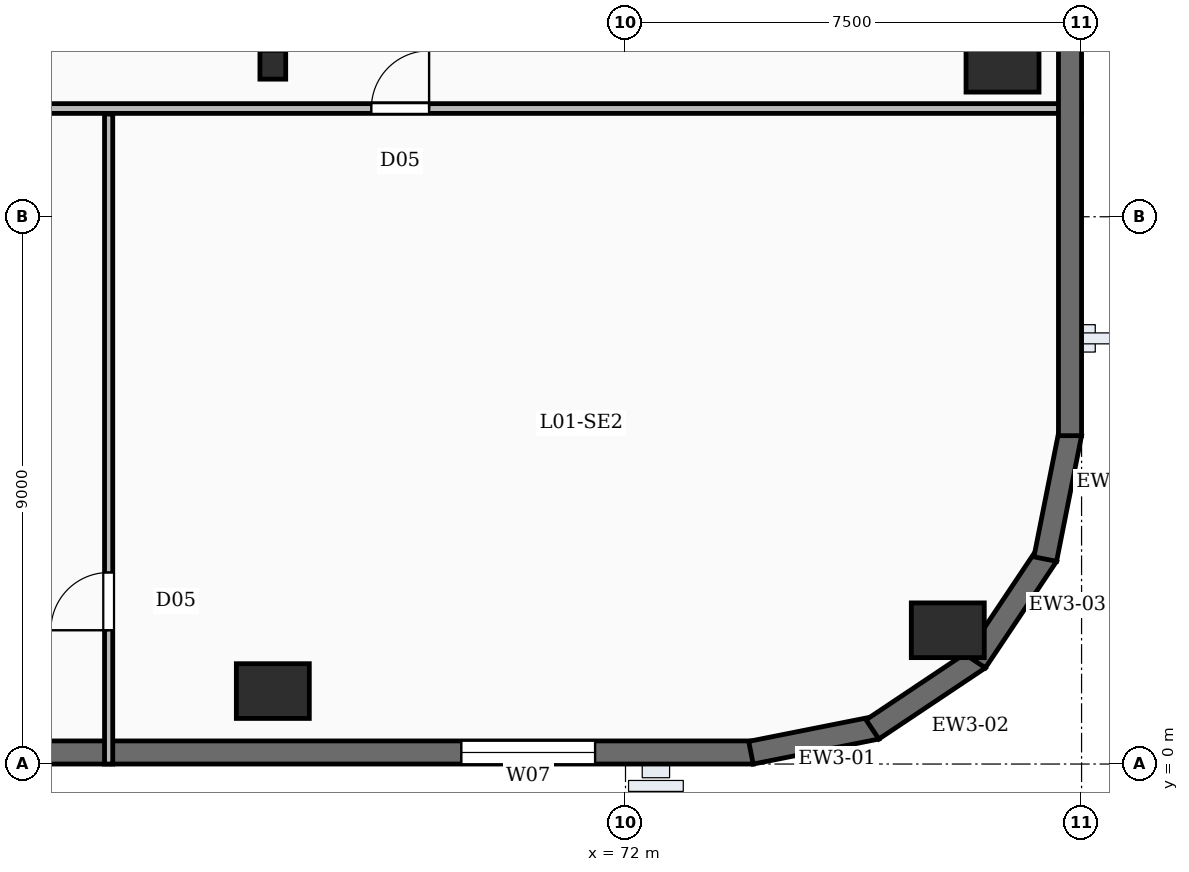
"""IFC4 building model, lengths in metres.
Left out: names, types, materials, properties, quantities, classifications, styles, units other than length and angle.
Written with IfcOpenShell. Run it as: python <this file> out.ifc"""

import sys

from ifc_helpers import new_model, si_unit, direction, frame, frame_2d, origin, origin_2d, place, context, subcontext, project, spatial, rectangle, i_section, extrude, element, fill, save


model = new_model("IFC4")
c1 = context("Model", 3, precision=1e-05, world=origin(), true_north=direction((0.0, 1.0)))
c2 = subcontext(c1, "Body", "Model", "MODEL_VIEW")
j1 = project(units=[si_unit("LENGTHUNIT", "METRE"), si_unit("PLANEANGLEUNIT", "RADIAN")], contexts=[c1])
p1 = place(None, origin())
s1 = spatial("IfcSite", under=j1, at=p1, CompositionType="ELEMENT")
p2 = place(p1, origin())
s2 = spatial("IfcBuilding", under=s1, at=p2, CompositionType="ELEMENT")
p3 = place(p2, frame((0.0, 0.0, 8.0)))
s3 = spatial("IfcBuildingStorey", under=s2, at=p3, CompositionType="ELEMENT", Elevation=8.0)
for number, where, z_axis, x_axis in (
    (1, (66.2, 1.2, -0.35), (0.0, 0.0, 1.0), (1.0, 0.0, 0.0)),
    (2, (77.3, 2.2, -0.35), (0.0, 0.0, 1.0), (1.0, 0.0, 0.0)),
    (3, (78.2, 11.5, -0.35), (0.0, 0.0, 1.0), (1.0, 0.0, 0.0)),
):
    element("IfcColumn", number, at=place(p3, frame(where, z_axis=z_axis, x_axis=x_axis)), inside=s3, PredefinedType="COLUMN", context=c2, shape_type="SweptSolid", body=[
        extrude(rectangle(XDim=1.2, YDim=0.9, at=origin_2d()), origin(), (0.0, 0.0, 1.0), 5.0),
    ])
p4 = place(p3, frame((66.2, 11.5, -0.35), z_axis=(0.0, 0.0, 1.0), x_axis=(1.0, 0.0, 0.0)))
e4 = element("IfcColumn", 4, at=p4, inside=s3, PredefinedType="COLUMN", context=c2, shape_type="SweptSolid", body=[
    extrude(i_section(OverallWidth=0.424, OverallDepth=0.474, WebThickness=0.048, FlangeThickness=0.077, FilletRadius=0.02, at=origin_2d()), origin(), (0.0, 0.0, 1.0), 5.0),
])
for number, where, z_axis, x_axis in (
    (5, (76.129, 0.597, 0.0), (0.0, 0.0, 1.0), (-0.981, -0.195, 0.0)),
    (6, (77.813, 1.74, 0.0), (0.0, 0.0, 1.0), (-0.832, -0.556, 0.0)),
    (7, (78.931, 3.439, 0.0), (0.0, 0.0, 1.0), (-0.556, -0.832, 0.0)),
    (8, (79.314, 5.437, 0.0), (0.0, 0.0, 1.0), (-0.195, -0.981, 0.0)),
):
    element("IfcWall", number, at=place(p3, frame(where, z_axis=z_axis, x_axis=x_axis)), inside=s3, PredefinedType="SOLIDWALL", context=c2, shape_type="SweptSolid", body=[
        extrude(rectangle(XDim=2.107, YDim=0.38, at=frame_2d((1.053, 0.0))), origin(), (0.0, 0.0, 1.0), 4.65),
    ])
p5 = place(p3, frame((79.31, 49.1, 0.0), z_axis=(0.0, 0.0, 1.0), x_axis=(0.0, -1.0, 0.0)))
e9 = element("IfcWall", 9, at=p5, inside=s3, PredefinedType="SOLIDWALL", context=c2, shape_type="SweptSolid", body=[
    extrude(rectangle(XDim=43.7, YDim=0.38, at=frame_2d((21.85, 0.0))), origin(), (0.0, 0.0, 1.0), 4.65),
])
p6 = place(p5, frame((2.6, 0.0, 0.95)))
e10 = element("IfcOpeningElement", 10, at=p6, cuts=e9, PredefinedType="OPENING", context=c2, shape_type="SweptSolid", body=[
    extrude(rectangle(XDim=2.2, YDim=2.5, at=frame_2d((1.1, 1.25))), frame((0.0, 0.2, 0.0), z_axis=(0.0, -1.0, 0.0), x_axis=(1.0, 0.0, 0.0)), (0.0, 0.0, 1.0), 0.4),
])
p7 = place(p5, frame((8.0, 0.0, 0.95)))
e11 = element("IfcOpeningElement", 11, at=p7, cuts=e9, PredefinedType="OPENING", context=c2, shape_type="SweptSolid", body=[
    extrude(rectangle(XDim=2.2, YDim=2.5, at=frame_2d((1.1, 1.25))), frame((0.0, 0.2, 0.0), z_axis=(0.0, -1.0, 0.0), x_axis=(1.0, 0.0, 0.0)), (0.0, 0.0, 1.0), 0.4),
])
p8 = place(p5, frame((29.6, 0.0, 0.95)))
e12 = element("IfcOpeningElement", 12, at=p8, cuts=e9, PredefinedType="OPENING", context=c2, shape_type="SweptSolid", body=[
    extrude(rectangle(XDim=2.2, YDim=2.5, at=frame_2d((1.1, 1.25))), frame((0.0, 0.2, 0.0), z_axis=(0.0, -1.0, 0.0), x_axis=(1.0, 0.0, 0.0)), (0.0, 0.0, 1.0), 0.4),
])
p9 = place(p3, frame((74.1, 0.19, 0.0), z_axis=(0.0, 0.0, 1.0), x_axis=(-1.0, 0.0, 0.0)))
e13 = element("IfcWall", 13, at=p9, inside=s3, PredefinedType="SOLIDWALL", context=c2, shape_type="SweptSolid", body=[
    extrude(rectangle(XDim=68.7, YDim=0.38, at=frame_2d((34.35, 0.0))), origin(), (0.0, 0.0, 1.0), 4.65),
])
p10 = place(p9, frame((2.6, 0.0, 0.95)))
e14 = element("IfcOpeningElement", 14, at=p10, cuts=e13, PredefinedType="OPENING", context=c2, shape_type="SweptSolid", body=[
    extrude(rectangle(XDim=2.2, YDim=2.5, at=frame_2d((1.1, 1.25))), frame((0.0, 0.2, 0.0), z_axis=(0.0, -1.0, 0.0), x_axis=(1.0, 0.0, 0.0)), (0.0, 0.0, 1.0), 0.4),
])
p11 = place(p9, frame((18.8, 0.0, 0.95)))
e15 = element("IfcOpeningElement", 15, at=p11, cuts=e13, PredefinedType="OPENING", context=c2, shape_type="SweptSolid", body=[
    extrude(rectangle(XDim=2.2, YDim=2.5, at=frame_2d((1.1, 1.25))), frame((0.0, 0.2, 0.0), z_axis=(0.0, -1.0, 0.0), x_axis=(1.0, 0.0, 0.0)), (0.0, 0.0, 1.0), 0.4),
])
p12 = place(p9, frame((29.6, 0.0, 0.95)))
e16 = element("IfcOpeningElement", 16, at=p12, cuts=e13, PredefinedType="OPENING", context=c2, shape_type="SweptSolid", body=[
    extrude(rectangle(XDim=2.2, YDim=2.5, at=frame_2d((1.1, 1.25))), frame((0.0, 0.2, 0.0), z_axis=(0.0, -1.0, 0.0), x_axis=(1.0, 0.0, 0.0)), (0.0, 0.0, 1.0), 0.4),
])
p13 = place(p9, frame((40.4, 0.0, 0.95)))
e17 = element("IfcOpeningElement", 17, at=p13, cuts=e13, PredefinedType="OPENING", context=c2, shape_type="SweptSolid", body=[
    extrude(rectangle(XDim=2.2, YDim=2.5, at=frame_2d((1.1, 1.25))), frame((0.0, 0.2, 0.0), z_axis=(0.0, -1.0, 0.0), x_axis=(1.0, 0.0, 0.0)), (0.0, 0.0, 1.0), 0.4),
])
p14 = place(p9, frame((45.8, 0.0, 0.95)))
e18 = element("IfcOpeningElement", 18, at=p14, cuts=e13, PredefinedType="OPENING", context=c2, shape_type="SweptSolid", body=[
    extrude(rectangle(XDim=2.2, YDim=2.5, at=frame_2d((1.1, 1.25))), frame((0.0, 0.2, 0.0), z_axis=(0.0, -1.0, 0.0), x_axis=(1.0, 0.0, 0.0)), (0.0, 0.0, 1.0), 0.4),
])
p15 = place(p9, frame((51.2, 0.0, 0.95)))
e19 = element("IfcOpeningElement", 19, at=p15, cuts=e13, PredefinedType="OPENING", context=c2, shape_type="SweptSolid", body=[
    extrude(rectangle(XDim=2.2, YDim=2.5, at=frame_2d((1.1, 1.25))), frame((0.0, 0.2, 0.0), z_axis=(0.0, -1.0, 0.0), x_axis=(1.0, 0.0, 0.0)), (0.0, 0.0, 1.0), 0.4),
])
p16 = place(p9, frame((56.6, 0.0, 0.95)))
e20 = element("IfcOpeningElement", 20, at=p16, cuts=e13, PredefinedType="OPENING", context=c2, shape_type="SweptSolid", body=[
    extrude(rectangle(XDim=2.2, YDim=2.5, at=frame_2d((1.1, 1.25))), frame((0.0, 0.2, 0.0), z_axis=(0.0, -1.0, 0.0), x_axis=(1.0, 0.0, 0.0)), (0.0, 0.0, 1.0), 0.4),
])
p17 = place(p9, frame((62.0, 0.0, 0.95)))
e21 = element("IfcOpeningElement", 21, at=p17, cuts=e13, PredefinedType="OPENING", context=c2, shape_type="SweptSolid", body=[
    extrude(rectangle(XDim=2.2, YDim=2.5, at=frame_2d((1.1, 1.25))), frame((0.0, 0.2, 0.0), z_axis=(0.0, -1.0, 0.0), x_axis=(1.0, 0.0, 0.0)), (0.0, 0.0, 1.0), 0.4),
])
p18 = place(p3, frame((63.5, 0.0, 0.0), z_axis=(0.0, 0.0, 1.0), x_axis=(0.0, 1.0, 0.0)))
e22 = element("IfcWall", 22, at=p18, inside=s3, PredefinedType="PARTITIONING", context=c2, shape_type="SweptSolid", body=[
    extrude(rectangle(XDim=10.69, YDim=0.135, at=frame_2d((5.345, 0.0))), origin(), (0.0, 0.0, 1.0), 3.71),
])
p19 = place(p18, frame((2.2, 0.0, 0.0)))
e23 = element("IfcOpeningElement", 23, at=p19, cuts=e22, PredefinedType="OPENING", context=c2, shape_type="SweptSolid", body=[
    extrude(rectangle(XDim=0.95, YDim=2.15, at=frame_2d((0.475, 1.075))), frame((0.0, 0.077, 0.0), z_axis=(0.0, -1.0, 0.0), x_axis=(1.0, 0.0, 0.0)), (0.0, 0.0, 1.0), 0.155),
])
p20 = place(p3, frame((49.8, 10.78, 0.0), z_axis=(0.0, 0.0, 1.0), x_axis=(1.0, 0.0, 0.0)))
e24 = element("IfcWall", 24, at=p20, inside=s3, PredefinedType="PARTITIONING", context=c2, shape_type="SweptSolid", body=[
    extrude(rectangle(XDim=29.7, YDim=0.16, at=frame_2d((14.85, 0.0))), origin(), (0.0, 0.0, 1.0), 3.71),
])
p21 = place(p20, frame((6.37, 0.0, 0.0)))
e25 = element("IfcOpeningElement", 25, at=p21, cuts=e24, PredefinedType="OPENING", context=c2, shape_type="SweptSolid", body=[
    extrude(rectangle(XDim=0.95, YDim=2.15, at=frame_2d((0.475, 1.075))), frame((0.0, 0.09, 0.0), z_axis=(0.0, -1.0, 0.0), x_axis=(1.0, 0.0, 0.0)), (0.0, 0.0, 1.0), 0.18),
])
p22 = place(p20, frame((18.02, 0.0, 0.0)))
e26 = element("IfcOpeningElement", 26, at=p22, cuts=e24, PredefinedType="OPENING", context=c2, shape_type="SweptSolid", body=[
    extrude(rectangle(XDim=0.95, YDim=2.15, at=frame_2d((0.475, 1.075))), frame((0.0, 0.09, 0.0), z_axis=(0.0, -1.0, 0.0), x_axis=(1.0, 0.0, 0.0)), (0.0, 0.0, 1.0), 0.18),
])
p23 = place(p10, origin())
e27 = element("IfcWindow", 27, at=p23, inside=s3, PartitioningType="DOUBLE_PANEL_VERTICAL", PredefinedType="WINDOW", context=c2, shape_type="SweptSolid", body=[
    extrude(rectangle(XDim=2.2, YDim=2.5, at=frame_2d((1.1, 1.25))), frame((0.0, 0.03, 0.0), z_axis=(0.0, -1.0, 0.0), x_axis=(1.0, 0.0, 0.0)), (0.0, 0.0, 1.0), 0.06),
])
fill(e14, e27)
p24 = place(p19, origin())
e28 = element("IfcDoor", 28, at=p24, inside=s3, OperationType="SINGLE_SWING_LEFT", PredefinedType="DOOR", context=c2, shape_type="SweptSolid", body=[
    extrude(rectangle(XDim=0.95, YDim=2.15, at=frame_2d((0.475, 1.075))), frame((0.0, 0.025, 0.0), z_axis=(0.0, -1.0, 0.0), x_axis=(1.0, 0.0, 0.0)), (0.0, 0.0, 1.0), 0.05),
])
fill(e23, e28)
p25 = place(p22, origin())
e29 = element("IfcDoor", 29, at=p25, inside=s3, OperationType="SINGLE_SWING_RIGHT", PredefinedType="DOOR", context=c2, shape_type="SweptSolid", body=[
    extrude(rectangle(XDim=0.95, YDim=2.15, at=frame_2d((0.475, 1.075))), frame((0.0, 0.025, 0.0), z_axis=(0.0, -1.0, 0.0), x_axis=(1.0, 0.0, 0.0)), (0.0, 0.0, 1.0), 0.05),
])
fill(e26, e29)
save(model, sys.argv[1])
